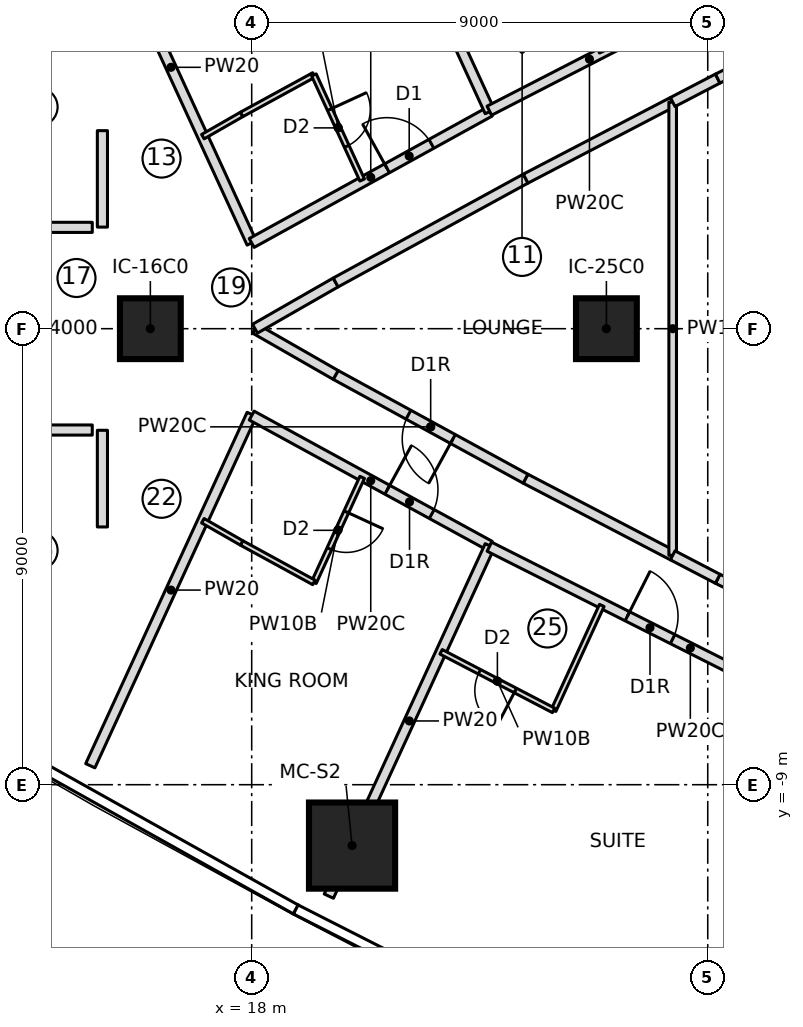
"""IFC4 building model, lengths in metres.
Left out: names, types, materials, properties, quantities, classifications, styles, units other than length and angle.
Written with IfcOpenShell. Run it as: python <this file> out.ifc"""

import sys

from ifc_helpers import new_model, si_unit, direction, frame, frame_2d, origin, origin_2d, place, context, subcontext, project, spatial, rectangle, extrude, element, fill, save


model = new_model("IFC4")
c1 = context("Model", 3, precision=1e-05, world=origin(), true_north=direction((0.0, 1.0)))
c2 = subcontext(c1, "Body", "Model", "MODEL_VIEW")
j1 = project(units=[si_unit("LENGTHUNIT", "METRE"), si_unit("PLANEANGLEUNIT", "RADIAN")], contexts=[c1])
p1 = place(None, origin())
s1 = spatial("IfcSite", under=j1, at=p1, CompositionType="ELEMENT")
p2 = place(p1, origin())
s2 = spatial("IfcBuilding", under=s1, at=p2, CompositionType="ELEMENT")
p3 = place(p2, frame((0.0, 0.0, 113.3)))
s3 = spatial("IfcBuildingStorey", under=s2, at=p3, CompositionType="ELEMENT", Elevation=113.3)
p4 = place(p3, frame((19.981, -10.202, 0.0), z_axis=(0.0, 0.0, 1.0), x_axis=(1.0, 0.0, 0.0)))
e1 = element("IfcColumn", 1, at=p4, inside=s3, PredefinedType="COLUMN", context=c2, shape_type="SweptSolid", body=[
    extrude(rectangle(XDim=1.7, YDim=1.7, at=origin_2d()), origin(), (0.0, 0.0, 1.0), 3.55),
])
for number, where, z_axis, x_axis in (
    (2, (16.0, 0.0, 0.0), (0.0, 0.0, 1.0), (1.0, 0.0, 0.0)),
    (3, (25.0, 0.0, 0.0), (0.0, 0.0, 1.0), (1.0, 0.0, 0.0)),
):
    element("IfcColumn", number, at=place(p3, frame(where, z_axis=z_axis, x_axis=x_axis)), inside=s3, PredefinedType="COLUMN", context=c2, shape_type="SweptSolid", body=[
        extrude(rectangle(XDim=1.2, YDim=1.2, at=origin_2d()), origin(), (0.0, 0.0, 1.0), 3.55),
    ])
p5 = place(p3, frame((11.685, 2.0, 0.0), z_axis=(0.0, 0.0, 1.0), x_axis=(1.0, 0.0, 0.0)))
e4 = element("IfcWall", 4, at=p5, inside=s3, PredefinedType="PARTITIONING", context=c2, shape_type="SweptSolid", body=[
    extrude(rectangle(XDim=3.168, YDim=0.2, at=frame_2d((1.584, 0.0))), origin(), (0.0, 0.0, 1.0), 3.25),
])
p6 = place(p5, frame((1.084, 0.0, 0.0)))
e5 = element("IfcOpeningElement", 5, at=p6, cuts=e4, PredefinedType="OPENING", context=c2, shape_type="SweptSolid", body=[
    extrude(rectangle(XDim=1.0, YDim=2.1, at=frame_2d((0.5, 1.05))), frame((0.0, 0.11, 0.0), z_axis=(0.0, -1.0, 0.0), x_axis=(1.0, 0.0, 0.0)), (0.0, 0.0, 1.0), 0.22),
])
p7 = place(p3, frame((11.685, -2.0, 0.0), z_axis=(0.0, 0.0, 1.0), x_axis=(1.0, 0.0, 0.0)))
e6 = element("IfcWall", 6, at=p7, inside=s3, PredefinedType="PARTITIONING", context=c2, shape_type="SweptSolid", body=[
    extrude(rectangle(XDim=3.168, YDim=0.2, at=frame_2d((1.584, 0.0))), origin(), (0.0, 0.0, 1.0), 3.25),
])
p8 = place(p7, frame((1.084, 0.0, 0.0)))
e7 = element("IfcOpeningElement", 7, at=p8, cuts=e6, PredefinedType="OPENING", context=c2, shape_type="SweptSolid", body=[
    extrude(rectangle(XDim=1.0, YDim=2.1, at=frame_2d((0.5, 1.05))), frame((0.0, 0.11, 0.0), z_axis=(0.0, -1.0, 0.0), x_axis=(1.0, 0.0, 0.0)), (0.0, 0.0, 1.0), 0.22),
])
p9 = place(p3, frame((14.815, 8.626, 0.0), z_axis=(0.0, 0.0, 1.0), x_axis=(0.417432341259, -0.908708006166, 0.0)))
e8 = element("IfcWall", 8, at=p9, inside=s3, PredefinedType="PARTITIONING", context=c2, shape_type="SweptSolid", body=[
    extrude(rectangle(XDim=7.631, YDim=0.2, at=frame_2d((3.815, 0.0))), origin(), (0.0, 0.0, 1.0), 3.25),
])
p10 = place(p3, frame((18.0, 1.692, 0.0), z_axis=(0.0, 0.0, 1.0), x_axis=(0.875548487611, 0.483130257634, 0.0)))
e9 = element("IfcWall", 9, at=p10, inside=s3, PredefinedType="PARTITIONING", context=c2, shape_type="SweptSolid", body=[
    extrude(rectangle(XDim=5.367, YDim=0.2, at=frame_2d((2.683, 0.0))), origin(), (0.0, 0.0, 1.0), 3.25),
])
p11 = place(p10, frame((3.05, 0.0, 0.0)))
e10 = element("IfcOpeningElement", 10, at=p11, cuts=e9, PredefinedType="OPENING", context=c2, shape_type="SweptSolid", body=[
    extrude(rectangle(XDim=1.0, YDim=2.1, at=frame_2d((0.5, 1.05))), frame((0.0, 0.11, 0.0), z_axis=(0.0, -1.0, 0.0), x_axis=(1.0, 0.0, 0.0)), (0.0, 0.0, 1.0), 0.22),
])
p12 = place(p3, frame((17.036, 3.79, 0.0), z_axis=(0.0, 0.0, 1.0), x_axis=(0.867629162742, 0.497211862248, 0.0)))
e11 = element("IfcWall", 11, at=p12, inside=s3, PredefinedType="PARTITIONING", context=c2, shape_type="SweptSolid", body=[
    extrude(rectangle(XDim=0.882, YDim=0.1, at=frame_2d((0.441, 0.0))), origin(), (0.0, 0.0, 1.0), 3.25),
])
p13 = place(p3, frame((17.801, 4.229, 0.0), z_axis=(0.0, 0.0, 1.0), x_axis=(0.877424481957, 0.479714788663, 0.0)))
e12 = element("IfcWall", 12, at=p13, inside=s3, PredefinedType="PARTITIONING", context=c2, shape_type="SweptSolid", body=[
    extrude(rectangle(XDim=1.625, YDim=0.1, at=frame_2d((0.813, 0.0))), origin(), (0.0, 0.0, 1.0), 3.25),
])
p14 = place(p3, frame((19.228, 5.008, 0.0), z_axis=(0.0, 0.0, 1.0), x_axis=(0.417450047292, -0.908699872354, 0.0)))
e13 = element("IfcWall", 13, at=p14, inside=s3, PredefinedType="PARTITIONING", context=c2, shape_type="SweptSolid", body=[
    extrude(rectangle(XDim=2.283, YDim=0.1, at=frame_2d((1.141, 0.0))), origin(), (0.0, 0.0, 1.0), 3.25),
])
p15 = place(p14, frame((0.75, 0.0, 0.0)))
e14 = element("IfcOpeningElement", 14, at=p15, cuts=e13, PredefinedType="OPENING", context=c2, shape_type="SweptSolid", body=[
    extrude(rectangle(XDim=0.8, YDim=2.1, at=frame_2d((0.4, 1.05))), frame((0.0, 0.06, 0.0), z_axis=(0.0, -1.0, 0.0), x_axis=(1.0, 0.0, 0.0)), (0.0, 0.0, 1.0), 0.12),
])
p16 = place(p3, frame((22.699, 4.284, 0.0), z_axis=(0.0, 0.0, 1.0), x_axis=(-0.417413534969, 0.908716644959, 0.0)))
e15 = element("IfcWall", 15, at=p16, inside=s3, PredefinedType="PARTITIONING", context=c2, shape_type="SweptSolid", body=[
    extrude(rectangle(XDim=7.609, YDim=0.2, at=frame_2d((3.805, 0.0))), origin(), (0.0, 0.0, 1.0), 3.25),
])
p17 = place(p3, frame((22.69, 4.302, 0.0), z_axis=(0.0, 0.0, 1.0), x_axis=(0.889236075961, 0.457448577667, 0.0)))
e16 = element("IfcWall", 16, at=p17, inside=s3, PredefinedType="PARTITIONING", context=c2, shape_type="SweptSolid", body=[
    extrude(rectangle(XDim=4.443, YDim=0.2, at=frame_2d((2.222, 0.0))), origin(), (0.0, 0.0, 1.0), 3.25),
])
p18 = place(p17, frame((3.05, 0.0, 0.0)))
e17 = element("IfcOpeningElement", 17, at=p18, cuts=e16, PredefinedType="OPENING", context=c2, shape_type="SweptSolid", body=[
    extrude(rectangle(XDim=1.0, YDim=2.1, at=frame_2d((0.5, 1.05))), frame((0.0, 0.11, 0.0), z_axis=(0.0, -1.0, 0.0), x_axis=(1.0, 0.0, 0.0)), (0.0, 0.0, 1.0), 0.22),
])
p19 = place(p3, frame((23.958, 7.533, 0.0), z_axis=(0.0, 0.0, 1.0), x_axis=(0.417454762401, -0.908697706253, 0.0)))
e18 = element("IfcWall", 18, at=p19, inside=s3, PredefinedType="PARTITIONING", context=c2, shape_type="SweptSolid", body=[
    extrude(rectangle(XDim=2.28, YDim=0.1, at=frame_2d((1.14, 0.0))), origin(), (0.0, 0.0, 1.0), 3.25),
])
p20 = place(p3, frame((14.815, -8.626, 0.0), z_axis=(0.0, 0.0, 1.0), x_axis=(0.417432341259, 0.908708006166, 0.0)))
e19 = element("IfcWall", 19, at=p20, inside=s3, PredefinedType="PARTITIONING", context=c2, shape_type="SweptSolid", body=[
    extrude(rectangle(XDim=7.631, YDim=0.2, at=frame_2d((3.815, 0.0))), origin(), (0.0, 0.0, 1.0), 3.25),
])
p21 = place(p3, frame((18.0, -1.715, 0.0), z_axis=(0.0, 0.0, 1.0), x_axis=(0.877354946945, -0.479841950096, 0.0)))
e20 = element("IfcWall", 20, at=p21, inside=s3, PredefinedType="PARTITIONING", context=c2, shape_type="SweptSolid", body=[
    extrude(rectangle(XDim=5.355, YDim=0.2, at=frame_2d((2.678, 0.0))), origin(), (0.0, 0.0, 1.0), 3.25),
])
p22 = place(p21, frame((3.05, 0.0, 0.0)))
e21 = element("IfcOpeningElement", 21, at=p22, cuts=e20, PredefinedType="OPENING", context=c2, shape_type="SweptSolid", body=[
    extrude(rectangle(XDim=1.0, YDim=2.1, at=frame_2d((0.5, 1.05))), frame((0.0, 0.11, 0.0), z_axis=(0.0, -1.0, 0.0), x_axis=(1.0, 0.0, 0.0)), (0.0, 0.0, 1.0), 0.22),
])
p23 = place(p3, frame((20.18, -2.934, 0.0), z_axis=(0.0, 0.0, 1.0), x_axis=(-0.417450047292, -0.908699872354, 0.0)))
e22 = element("IfcWall", 22, at=p23, inside=s3, PredefinedType="PARTITIONING", context=c2, shape_type="SweptSolid", body=[
    extrude(rectangle(XDim=2.283, YDim=0.1, at=frame_2d((1.141, 0.0))), origin(), (0.0, 0.0, 1.0), 3.25),
])
p24 = place(p23, frame((0.75, 0.0, 0.0)))
e23 = element("IfcOpeningElement", 23, at=p24, cuts=e22, PredefinedType="OPENING", context=c2, shape_type="SweptSolid", body=[
    extrude(rectangle(XDim=0.8, YDim=2.1, at=frame_2d((0.4, 1.05))), frame((0.0, 0.06, 0.0), z_axis=(0.0, -1.0, 0.0), x_axis=(1.0, 0.0, 0.0)), (0.0, 0.0, 1.0), 0.12),
])
p25 = place(p3, frame((19.228, -5.008, 0.0), z_axis=(0.0, 0.0, 1.0), x_axis=(-0.877424481957, 0.479714788663, 0.0)))
e24 = element("IfcWall", 24, at=p25, inside=s3, PredefinedType="PARTITIONING", context=c2, shape_type="SweptSolid", body=[
    extrude(rectangle(XDim=1.625, YDim=0.1, at=frame_2d((0.813, 0.0))), origin(), (0.0, 0.0, 1.0), 3.25),
])
p26 = place(p3, frame((17.801, -4.229, 0.0), z_axis=(0.0, 0.0, 1.0), x_axis=(-0.867629162742, 0.497211862248, 0.0)))
e25 = element("IfcWall", 25, at=p26, inside=s3, PredefinedType="PARTITIONING", context=c2, shape_type="SweptSolid", body=[
    extrude(rectangle(XDim=0.882, YDim=0.1, at=frame_2d((0.441, 0.0))), origin(), (0.0, 0.0, 1.0), 3.25),
])
p27 = place(p3, frame((19.522, -11.199, 0.0), z_axis=(0.0, 0.0, 1.0), x_axis=(0.417413534969, 0.908716644959, 0.0)))
e26 = element("IfcWall", 26, at=p27, inside=s3, PredefinedType="PARTITIONING", context=c2, shape_type="SweptSolid", body=[
    extrude(rectangle(XDim=7.609, YDim=0.2, at=frame_2d((3.805, 0.0))), origin(), (0.0, 0.0, 1.0), 3.25),
])
p28 = place(p3, frame((22.69, -4.302, 0.0), z_axis=(0.0, 0.0, 1.0), x_axis=(0.892904919467, -0.450245271815, 0.0)))
e27 = element("IfcWall", 27, at=p28, inside=s3, PredefinedType="PARTITIONING", context=c2, shape_type="SweptSolid", body=[
    extrude(rectangle(XDim=8.883, YDim=0.2, at=frame_2d((4.441, 0.0))), origin(), (0.0, 0.0, 1.0), 3.25),
])
p29 = place(p28, frame((3.05, 0.0, 0.0)))
e28 = element("IfcOpeningElement", 28, at=p29, cuts=e27, PredefinedType="OPENING", context=c2, shape_type="SweptSolid", body=[
    extrude(rectangle(XDim=1.0, YDim=2.1, at=frame_2d((0.5, 1.05))), frame((0.0, 0.11, 0.0), z_axis=(0.0, -1.0, 0.0), x_axis=(1.0, 0.0, 0.0)), (0.0, 0.0, 1.0), 0.22),
])
p30 = place(p3, frame((24.909, -5.462, 0.0), z_axis=(0.0, 0.0, 1.0), x_axis=(-0.417454762401, -0.908697706253, 0.0)))
e29 = element("IfcWall", 29, at=p30, inside=s3, PredefinedType="PARTITIONING", context=c2, shape_type="SweptSolid", body=[
    extrude(rectangle(XDim=2.28, YDim=0.1, at=frame_2d((1.14, 0.0))), origin(), (0.0, 0.0, 1.0), 3.25),
])
p31 = place(p3, frame((23.958, -7.533, 0.0), z_axis=(0.0, 0.0, 1.0), x_axis=(-0.886911586599, 0.461939214135, 0.0)))
e30 = element("IfcWall", 30, at=p31, inside=s3, PredefinedType="PARTITIONING", context=c2, shape_type="SweptSolid", body=[
    extrude(rectangle(XDim=2.503, YDim=0.1, at=frame_2d((1.251, 0.0))), origin(), (0.0, 0.0, 1.0), 3.25),
])
p32 = place(p31, frame((0.85, 0.0, 0.0)))
e31 = element("IfcOpeningElement", 31, at=p32, cuts=e30, PredefinedType="OPENING", context=c2, shape_type="SweptSolid", body=[
    extrude(rectangle(XDim=0.8, YDim=2.1, at=frame_2d((0.4, 1.05))), frame((0.0, 0.06, 0.0), z_axis=(0.0, -1.0, 0.0), x_axis=(1.0, 0.0, 0.0)), (0.0, 0.0, 1.0), 0.12),
])
p33 = place(p3, frame((23.407, -2.962, 0.0), z_axis=(0.0, 0.0, 1.0), x_axis=(-0.877465075585, 0.479640533242, 0.0)))
e32 = element("IfcWall", 32, at=p33, inside=s3, PredefinedType="PARTITIONING", context=c2, shape_type="SweptSolid", body=[
    extrude(rectangle(XDim=4.273, YDim=0.2, at=frame_2d((2.137, 0.0))), origin(), (0.0, 0.0, 1.0), 3.25),
])
p34 = place(p33, frame((1.636, 0.0, 0.0)))
e33 = element("IfcOpeningElement", 33, at=p34, cuts=e32, PredefinedType="OPENING", context=c2, shape_type="SweptSolid", body=[
    extrude(rectangle(XDim=1.0, YDim=2.1, at=frame_2d((0.5, 1.05))), frame((0.0, 0.11, 0.0), z_axis=(0.0, -1.0, 0.0), x_axis=(1.0, 0.0, 0.0)), (0.0, 0.0, 1.0), 0.22),
])
for number, where, z_axis, x_axis in (
    (34, (19.657, -0.912, 0.0), (0.0, 0.0, 1.0), (-0.868, 0.497, 0.0)),
    (35, (18.065, 0.0, 0.0), (0.0, 0.0, 1.0), (0.868, 0.497, 0.0)),
):
    element("IfcWall", number, at=place(p3, frame(where, z_axis=z_axis, x_axis=x_axis)), inside=s3, PredefinedType="PARTITIONING", context=c2, shape_type="SweptSolid", body=[
        extrude(rectangle(XDim=1.835, YDim=0.2, at=frame_2d((0.918, 0.0))), origin(), (0.0, 0.0, 1.0), 3.25),
    ])
p35 = place(p3, frame((19.657, 0.912, 0.0), z_axis=(0.0, 0.0, 1.0), x_axis=(0.877465075585, 0.479640533242, 0.0)))
e36 = element("IfcWall", 36, at=p35, inside=s3, PredefinedType="PARTITIONING", context=c2, shape_type="SweptSolid", body=[
    extrude(rectangle(XDim=4.273, YDim=0.2, at=frame_2d((2.137, 0.0))), origin(), (0.0, 0.0, 1.0), 3.25),
])
for number, where, z_axis, x_axis in (
    (37, (23.407, 2.962, 0.0), (0.0, 0.0, 1.0), (0.887, 0.462, 0.0)),
    (38, (26.308, -4.473, 0.0), (0.0, 0.0, 1.0), (-0.887, 0.462, 0.0)),
):
    element("IfcWall", number, at=place(p3, frame(where, z_axis=z_axis, x_axis=x_axis)), inside=s3, PredefinedType="PARTITIONING", context=c2, shape_type="SweptSolid", body=[
        extrude(rectangle(XDim=3.271, YDim=0.2, at=frame_2d((1.636, 0.0))), origin(), (0.0, 0.0, 1.0), 3.25),
    ])
p36 = place(p3, frame((26.308, -4.473, 0.0), z_axis=(0.0, 0.0, 1.0), x_axis=(0.0, 1.0, 0.0)))
e39 = element("IfcWall", 39, at=p36, inside=s3, PredefinedType="PARTITIONING", context=c2, shape_type="SweptSolid", body=[
    extrude(rectangle(XDim=8.946, YDim=0.15, at=frame_2d((4.473, 0.0))), origin(), (0.0, 0.0, 1.0), 3.25),
])
p37 = place(p3, frame((29.308, -5.983, 0.0), z_axis=(0.0, 0.0, 1.0), x_axis=(-0.895954899574, 0.444145041546, 0.0)))
e40 = element("IfcWall", 40, at=p37, inside=s3, PredefinedType="PARTITIONING", context=c2, shape_type="SweptSolid", body=[
    extrude(rectangle(XDim=2.357, YDim=0.2, at=frame_2d((1.179, 0.0))), origin(), (0.0, 0.0, 1.0), 3.25),
])
p38 = place(p37, frame((0.678, 0.0, 0.0)))
e41 = element("IfcOpeningElement", 41, at=p38, cuts=e40, PredefinedType="OPENING", context=c2, shape_type="SweptSolid", body=[
    extrude(rectangle(XDim=1.0, YDim=2.1, at=frame_2d((0.5, 1.05))), frame((0.0, 0.11, 0.0), z_axis=(0.0, -1.0, 0.0), x_axis=(1.0, 0.0, 0.0)), (0.0, 0.0, 1.0), 0.22),
])
for number, where, z_axis, x_axis in (
    (42, (27.196, -4.936, 0.0), (0.0, 0.0, 1.0), (-0.887, 0.462, 0.0)),
    (43, (26.308, 4.473, 0.0), (0.0, 0.0, 1.0), (0.887, 0.462, 0.0)),
):
    element("IfcWall", number, at=place(p3, frame(where, z_axis=z_axis, x_axis=x_axis)), inside=s3, PredefinedType="PARTITIONING", context=c2, shape_type="SweptSolid", body=[
        extrude(rectangle(XDim=1.001, YDim=0.2, at=frame_2d((0.501, 0.0))), origin(), (0.0, 0.0, 1.0), 3.25),
    ])
p39 = place(p3, frame((27.196, 4.936, 0.0), z_axis=(0.0, 0.0, 1.0), x_axis=(0.895954899574, 0.444145041546, 0.0)))
e44 = element("IfcWall", 44, at=p39, inside=s3, PredefinedType="PARTITIONING", context=c2, shape_type="SweptSolid", body=[
    extrude(rectangle(XDim=2.357, YDim=0.2, at=frame_2d((1.179, 0.0))), origin(), (0.0, 0.0, 1.0), 3.25),
])
p40 = place(p3, frame((15.054, 3.909, 0.0), z_axis=(0.0, 0.0, 1.0), x_axis=(0.0, -1.0, 0.0)))
e45 = element("IfcWall", 45, at=p40, inside=s3, PredefinedType="PARTITIONING", context=c2, shape_type="SweptSolid", body=[
    extrude(rectangle(XDim=1.904, YDim=0.2, at=frame_2d((0.952, 0.0))), origin(), (0.0, 0.0, 1.0), 3.25),
])
p41 = place(p3, frame((15.054, -2.005, 0.0), z_axis=(0.0, 0.0, 1.0), x_axis=(0.0, -1.0, 0.0)))
e46 = element("IfcWall", 46, at=p41, inside=s3, PredefinedType="PARTITIONING", context=c2, shape_type="SweptSolid", body=[
    extrude(rectangle(XDim=1.908, YDim=0.2, at=frame_2d((0.954, 0.0))), origin(), (0.0, 0.0, 1.0), 3.25),
])
p42 = place(p15, origin())
e47 = element("IfcDoor", 47, at=p42, inside=s3, OperationType="SINGLE_SWING_LEFT", PredefinedType="DOOR", context=c2, shape_type="SweptSolid", body=[
    extrude(rectangle(XDim=0.8, YDim=2.1, at=frame_2d((0.4, 1.05))), frame((0.0, 0.025, 0.0), z_axis=(0.0, -1.0, 0.0), x_axis=(1.0, 0.0, 0.0)), (0.0, 0.0, 1.0), 0.05),
])
fill(e14, e47)
p43 = place(p11, origin())
e48 = element("IfcDoor", 48, at=p43, inside=s3, OperationType="SINGLE_SWING_LEFT", PredefinedType="DOOR", context=c2, shape_type="SweptSolid", body=[
    extrude(rectangle(XDim=1.0, YDim=2.1, at=frame_2d((0.5, 1.05))), frame((0.0, 0.025, 0.0), z_axis=(0.0, -1.0, 0.0), x_axis=(1.0, 0.0, 0.0)), (0.0, 0.0, 1.0), 0.05),
])
fill(e10, e48)
p44 = place(p24, origin())
e49 = element("IfcDoor", 49, at=p44, inside=s3, OperationType="SINGLE_SWING_LEFT", PredefinedType="DOOR", context=c2, shape_type="SweptSolid", body=[
    extrude(rectangle(XDim=0.8, YDim=2.1, at=frame_2d((0.4, 1.05))), frame((0.0, 0.025, 0.0), z_axis=(0.0, -1.0, 0.0), x_axis=(1.0, 0.0, 0.0)), (0.0, 0.0, 1.0), 0.05),
])
fill(e23, e49)
p45 = place(p22, origin())
e50 = element("IfcDoor", 50, at=p45, inside=s3, OperationType="SINGLE_SWING_RIGHT", PredefinedType="DOOR", context=c2, shape_type="SweptSolid", body=[
    extrude(rectangle(XDim=1.0, YDim=2.1, at=frame_2d((0.5, 1.05))), frame((0.0, 0.025, 0.0), z_axis=(0.0, -1.0, 0.0), x_axis=(1.0, 0.0, 0.0)), (0.0, 0.0, 1.0), 0.05),
])
fill(e21, e50)
p46 = place(p32, origin())
e51 = element("IfcDoor", 51, at=p46, inside=s3, OperationType="SINGLE_SWING_LEFT", PredefinedType="DOOR", context=c2, shape_type="SweptSolid", body=[
    extrude(rectangle(XDim=0.8, YDim=2.1, at=frame_2d((0.4, 1.05))), frame((0.0, 0.025, 0.0), z_axis=(0.0, -1.0, 0.0), x_axis=(1.0, 0.0, 0.0)), (0.0, 0.0, 1.0), 0.05),
])
fill(e31, e51)
p47 = place(p29, origin())
e52 = element("IfcDoor", 52, at=p47, inside=s3, OperationType="SINGLE_SWING_RIGHT", PredefinedType="DOOR", context=c2, shape_type="SweptSolid", body=[
    extrude(rectangle(XDim=1.0, YDim=2.1, at=frame_2d((0.5, 1.05))), frame((0.0, 0.025, 0.0), z_axis=(0.0, -1.0, 0.0), x_axis=(1.0, 0.0, 0.0)), (0.0, 0.0, 1.0), 0.05),
])
fill(e28, e52)
p48 = place(p34, origin())
e53 = element("IfcDoor", 53, at=p48, inside=s3, OperationType="SINGLE_SWING_RIGHT", PredefinedType="DOOR", context=c2, shape_type="SweptSolid", body=[
    extrude(rectangle(XDim=1.0, YDim=2.1, at=frame_2d((0.5, 1.05))), frame((0.0, 0.025, 0.0), z_axis=(0.0, -1.0, 0.0), x_axis=(1.0, 0.0, 0.0)), (0.0, 0.0, 1.0), 0.05),
])
fill(e33, e53)
save(model, sys.argv[1])
